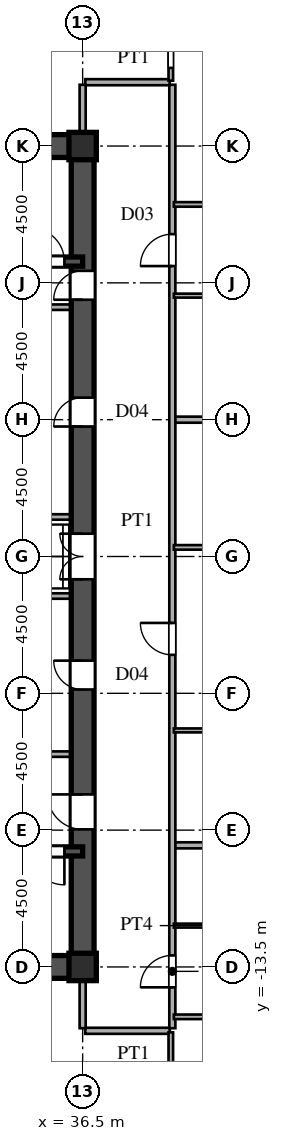
"""IFC4 building model, lengths in metres.
Left out: names, types, materials, properties, quantities, classifications, styles, units other than length and angle.
Written with IfcOpenShell. Run it as: python <this file> out.ifc"""

import sys

from ifc_helpers import new_model, si_unit, direction, frame, frame_2d, origin, origin_2d, place, context, subcontext, project, spatial, rectangle, i_section, extrude, source, transform, mapped, element, fill, save


model = new_model("IFC4")
c1 = context("Model", 3, precision=1e-05, world=origin(), true_north=direction((0.0, 1.0)))
c2 = subcontext(c1, "Body", "Model", "MODEL_VIEW")
j1 = project(units=[si_unit("LENGTHUNIT", "METRE"), si_unit("PLANEANGLEUNIT", "RADIAN")], contexts=[c1])
p1 = place(None, origin())
s1 = spatial("IfcSite", under=j1, at=p1, CompositionType="ELEMENT")
p2 = place(p1, origin())
s2 = spatial("IfcBuilding", under=s1, at=p2, CompositionType="ELEMENT")
p3 = place(p2, frame((0.0, 0.0, 18.9)))
s3 = spatial("IfcBuildingStorey", under=s2, at=p3, CompositionType="ELEMENT", Elevation=18.9)
m1 = source(origin(), c2, "Body", "SweptSolid", [
    extrude(i_section(OverallWidth=0.9, OverallDepth=0.9, WebThickness=0.036, FlangeThickness=0.055, at=origin_2d()), origin(), (0.0, 0.0, 1.0), 3.6),
])
for number, where, z_axis, x_axis in (
    (1, (36.5, -13.5, 0.0), (0.0, 0.0, 1.0), (1.0, 0.0, 0.0)),
    (2, (36.5, 13.5, 0.0), (0.0, 0.0, 1.0), (1.0, 0.0, 0.0)),
):
    element("IfcColumn", number, at=place(p3, frame(where, z_axis=z_axis, x_axis=x_axis)), inside=s3, PredefinedType="COLUMN", context=c2, shape_type="MappedRepresentation", body=[
        mapped(m1, transform((0.0, 0.0, 0.0), scale=1.0)),
    ])
for number, where, z_axis, x_axis in (
    (3, (27.5, -13.5, 0.0), (0.0, 0.0, 1.0), (1.0, 0.0, 0.0)),
    (4, (27.5, 13.5, 0.0), (0.0, 0.0, 1.0), (1.0, 0.0, 0.0)),
):
    element("IfcWall", number, at=place(p3, frame(where, z_axis=z_axis, x_axis=x_axis)), inside=s3, PredefinedType="SHEAR", context=c2, shape_type="SweptSolid", body=[
        extrude(rectangle(XDim=9.0, YDim=0.75, at=frame_2d((4.5, 0.0))), origin(), (0.0, 0.0, 1.0), 3.38),
    ])
p4 = place(p3, frame((36.5, -13.65, 0.0), z_axis=(0.0, 0.0, 1.0), x_axis=(0.0, 1.0, 0.0)))
e5 = element("IfcWall", 5, at=p4, inside=s3, PredefinedType="SHEAR", context=c2, shape_type="SweptSolid", body=[
    extrude(rectangle(XDim=7.15, YDim=0.75, at=frame_2d((3.575, 0.0))), origin(), (0.0, 0.0, 1.0), 3.38),
])
p5 = place(p4, frame((4.675, 0.0, 0.0)))
e6 = element("IfcOpeningElement", 6, at=p5, cuts=e5, PredefinedType="OPENING", context=c2, shape_type="SweptSolid", body=[
    extrude(rectangle(XDim=1.15, YDim=2.2, at=frame_2d((0.575, 1.1))), frame((0.0, 0.385, 0.0), z_axis=(0.0, -1.0, 0.0), x_axis=(1.0, 0.0, 0.0)), (0.0, 0.0, 1.0), 0.77),
])
p6 = place(p3, frame((36.5, -1.3, 0.0), z_axis=(0.0, 0.0, 1.0), x_axis=(0.0, 1.0, 0.0)))
e7 = element("IfcWall", 7, at=p6, inside=s3, PredefinedType="SHEAR", context=c2, shape_type="SweptSolid", body=[
    extrude(rectangle(XDim=2.6, YDim=0.75, at=frame_2d((1.3, 0.0))), origin(), (0.0, 0.0, 1.0), 3.38),
])
p7 = place(p6, frame((0.55, 0.0, 0.0)))
e8 = element("IfcOpeningElement", 8, at=p7, cuts=e7, PredefinedType="OPENING", context=c2, shape_type="SweptSolid", body=[
    extrude(rectangle(XDim=1.5, YDim=2.3, at=frame_2d((0.75, 1.15))), frame((0.0, 0.385, 0.0), z_axis=(0.0, -1.0, 0.0), x_axis=(1.0, 0.0, 0.0)), (0.0, 0.0, 1.0), 0.77),
])
p8 = place(p3, frame((36.5, 8.2, 0.0), z_axis=(0.0, 0.0, 1.0), x_axis=(0.0, 1.0, 0.0)))
e9 = element("IfcWall", 9, at=p8, inside=s3, PredefinedType="SHEAR", context=c2, shape_type="SweptSolid", body=[
    extrude(rectangle(XDim=5.45, YDim=0.75, at=frame_2d((2.725, 0.0))), origin(), (0.0, 0.0, 1.0), 3.38),
])
p9 = place(p8, frame((0.245, 0.0, 0.0)))
e10 = element("IfcOpeningElement", 10, at=p9, cuts=e9, PredefinedType="OPENING", context=c2, shape_type="SweptSolid", body=[
    extrude(rectangle(XDim=0.95, YDim=2.15, at=frame_2d((0.475, 1.075))), frame((0.0, 0.385, 0.0), z_axis=(0.0, -1.0, 0.0), x_axis=(1.0, 0.0, 0.0)), (0.0, 0.0, 1.0), 0.77),
])
p10 = place(p3, frame((36.5, -6.5, 0.0), z_axis=(0.0, 0.0, 1.0), x_axis=(0.0, 1.0, 0.0)))
e11 = element("IfcWall", 11, at=p10, inside=s3, PredefinedType="SHEAR", context=c2, shape_type="SweptSolid", body=[
    extrude(rectangle(XDim=5.2, YDim=0.75, at=frame_2d((2.6, 0.0))), origin(), (0.0, 0.0, 1.0), 3.38),
])
p11 = place(p10, frame((2.125, 0.0, 0.0)))
e12 = element("IfcOpeningElement", 12, at=p11, cuts=e11, PredefinedType="OPENING", context=c2, shape_type="SweptSolid", body=[
    extrude(rectangle(XDim=0.95, YDim=2.15, at=frame_2d((0.475, 1.075))), frame((0.0, 0.385, 0.0), z_axis=(0.0, -1.0, 0.0), x_axis=(1.0, 0.0, 0.0)), (0.0, 0.0, 1.0), 0.77),
])
p12 = place(p3, frame((36.5, 1.3, 0.0), z_axis=(0.0, 0.0, 1.0), x_axis=(0.0, 1.0, 0.0)))
e13 = element("IfcWall", 13, at=p12, inside=s3, PredefinedType="SHEAR", context=c2, shape_type="SweptSolid", body=[
    extrude(rectangle(XDim=6.9, YDim=0.75, at=frame_2d((3.45, 0.0))), origin(), (0.0, 0.0, 1.0), 3.38),
])
p13 = place(p12, frame((2.975, 0.0, 0.0)))
e14 = element("IfcOpeningElement", 14, at=p13, cuts=e13, PredefinedType="OPENING", context=c2, shape_type="SweptSolid", body=[
    extrude(rectangle(XDim=0.95, YDim=2.15, at=frame_2d((0.475, 1.075))), frame((0.0, 0.385, 0.0), z_axis=(0.0, -1.0, 0.0), x_axis=(1.0, 0.0, 0.0)), (0.0, 0.0, 1.0), 0.77),
])
p14 = place(p3, frame((27.5, -9.7, 0.0), z_axis=(0.0, 0.0, 1.0), x_axis=(1.0, 0.0, 0.0)))
e15 = element("IfcWall", 15, at=p14, inside=s3, PredefinedType="SHEAR", context=c2, shape_type="SweptSolid", body=[
    extrude(rectangle(XDim=9.0, YDim=0.3, at=frame_2d((4.5, 0.0))), origin(), (0.0, 0.0, 1.0), 3.38),
])
p15 = place(p14, frame((7.3, 0.0, 0.0)))
e16 = element("IfcOpeningElement", 16, at=p15, cuts=e15, PredefinedType="OPENING", context=c2, shape_type="SweptSolid", body=[
    extrude(rectangle(XDim=1.1, YDim=2.2, at=frame_2d((0.55, 1.1))), frame((0.0, 0.16, 0.0), z_axis=(0.0, -1.0, 0.0), x_axis=(1.0, 0.0, 0.0)), (0.0, 0.0, 1.0), 0.32),
])
p16 = place(p3, frame((27.5, 9.7, 0.0), z_axis=(0.0, 0.0, 1.0), x_axis=(1.0, 0.0, 0.0)))
e17 = element("IfcWall", 17, at=p16, inside=s3, PredefinedType="SHEAR", context=c2, shape_type="SweptSolid", body=[
    extrude(rectangle(XDim=9.0, YDim=0.3, at=frame_2d((4.5, 0.0))), origin(), (0.0, 0.0, 1.0), 3.38),
])
p17 = place(p16, frame((7.3, 0.0, 0.0)))
e18 = element("IfcOpeningElement", 18, at=p17, cuts=e17, PredefinedType="OPENING", context=c2, shape_type="SweptSolid", body=[
    extrude(rectangle(XDim=1.1, YDim=2.2, at=frame_2d((0.55, 1.1))), frame((0.0, 0.16, 0.0), z_axis=(0.0, -1.0, 0.0), x_axis=(1.0, 0.0, 0.0)), (0.0, 0.0, 1.0), 0.32),
])
for number, where, z_axis, x_axis in (
    (19, (30.45, -6.5, 0.0), (0.0, 0.0, 1.0), (1.0, 0.0, 0.0)),
    (20, (30.45, 8.2, 0.0), (0.0, 0.0, 1.0), (1.0, 0.0, 0.0)),
):
    element("IfcWall", number, at=place(p3, frame(where, z_axis=z_axis, x_axis=x_axis)), inside=s3, PredefinedType="PARTITIONING", context=c2, shape_type="SweptSolid", body=[
        extrude(rectangle(XDim=5.7, YDim=0.18, at=frame_2d((2.85, 0.0))), origin(), (0.0, 0.0, 1.0), 3.38),
    ])
for number, where, z_axis, x_axis in (
    (21, (33.2, -1.3, 0.0), (0.0, 0.0, 1.0), (1.0, 0.0, 0.0)),
    (22, (33.2, 1.3, 0.0), (0.0, 0.0, 1.0), (1.0, 0.0, 0.0)),
):
    element("IfcWall", number, at=place(p3, frame(where, z_axis=z_axis, x_axis=x_axis)), inside=s3, PredefinedType="PARTITIONING", context=c2, shape_type="SweptSolid", body=[
        extrude(rectangle(XDim=2.95, YDim=0.18, at=frame_2d((1.475, 0.0))), origin(), (0.0, 0.0, 1.0), 3.38),
    ])
p18 = place(p3, frame((36.585, -15.6, 0.0), z_axis=(0.0, 0.0, 1.0), x_axis=(1.0, 0.0, 0.0)))
e23 = element("IfcWall", 23, at=p18, inside=s3, PredefinedType="PARTITIONING", context=c2, shape_type="SweptSolid", body=[
    extrude(rectangle(XDim=2.78, YDim=0.2, at=frame_2d((1.39, 0.0))), origin(), (0.0, 0.0, 1.0), 3.38),
])
p19 = place(p3, frame((39.5, -15.14, 0.0), z_axis=(0.0, 0.0, 1.0), x_axis=(1.0, 0.0, 0.0)))
e24 = element("IfcWall", 24, at=p19, inside=s3, PredefinedType="PARTITIONING", context=c2, shape_type="SweptSolid", body=[
    extrude(rectangle(XDim=4.05, YDim=0.15, at=frame_2d((2.025, 0.0))), origin(), (0.0, 0.0, 1.0), 3.38),
])
p20 = place(p19, frame((1.55, 0.0, 0.0)))
e25 = element("IfcOpeningElement", 25, at=p20, cuts=e24, PredefinedType="OPENING", context=c2, shape_type="SweptSolid", body=[
    extrude(rectangle(XDim=0.95, YDim=2.15, at=frame_2d((0.475, 1.075))), frame((0.0, 0.085, 0.0), z_axis=(0.0, -1.0, 0.0), x_axis=(1.0, 0.0, 0.0)), (0.0, 0.0, 1.0), 0.17),
])
p21 = place(p3, frame((39.5, -12.14, 0.0), z_axis=(0.0, 0.0, 1.0), x_axis=(1.0, 0.0, 0.0)))
e26 = element("IfcWall", 26, at=p21, inside=s3, PredefinedType="PARTITIONING", context=c2, shape_type="SweptSolid", body=[
    extrude(rectangle(XDim=4.05, YDim=0.13, at=frame_2d((2.025, 0.0))), origin(), (0.0, 0.0, 1.0), 3.38),
])
p22 = place(p21, frame((1.585, 0.0, 0.0)))
e27 = element("IfcOpeningElement", 27, at=p22, cuts=e26, PredefinedType="OPENING", context=c2, shape_type="SweptSolid", body=[
    extrude(rectangle(XDim=0.88, YDim=2.1, at=frame_2d((0.44, 1.05))), frame((0.0, 0.075, 0.0), z_axis=(0.0, -1.0, 0.0), x_axis=(1.0, 0.0, 0.0)), (0.0, 0.0, 1.0), 0.15),
])
p23 = place(p3, frame((39.53, -9.5, 0.0), z_axis=(0.0, 0.0, 1.0), x_axis=(1.0, 0.0, 0.0)))
e28 = element("IfcWall", 28, at=p23, inside=s3, PredefinedType="PARTITIONING", context=c2, shape_type="SweptSolid", body=[
    extrude(rectangle(XDim=32.845, YDim=0.2, at=frame_2d((16.422, 0.0))), origin(), (0.0, 0.0, 1.0), 3.38),
])
p24 = place(p3, frame((39.5, -5.72, 0.0), z_axis=(0.0, 0.0, 1.0), x_axis=(1.0, 0.0, 0.0)))
e29 = element("IfcWall", 29, at=p24, inside=s3, PredefinedType="PARTITIONING", context=c2, shape_type="SweptSolid", body=[
    extrude(rectangle(XDim=4.05, YDim=0.13, at=frame_2d((2.025, 0.0))), origin(), (0.0, 0.0, 1.0), 3.38),
])
p25 = place(p24, frame((1.585, 0.0, 0.0)))
e30 = element("IfcOpeningElement", 30, at=p25, cuts=e29, PredefinedType="OPENING", context=c2, shape_type="SweptSolid", body=[
    extrude(rectangle(XDim=0.88, YDim=2.1, at=frame_2d((0.44, 1.05))), frame((0.0, 0.075, 0.0), z_axis=(0.0, -1.0, 0.0), x_axis=(1.0, 0.0, 0.0)), (0.0, 0.0, 1.0), 0.15),
])
p26 = place(p3, frame((39.5, 0.3, 0.0), z_axis=(0.0, 0.0, 1.0), x_axis=(1.0, 0.0, 0.0)))
e31 = element("IfcWall", 31, at=p26, inside=s3, PredefinedType="PARTITIONING", context=c2, shape_type="SweptSolid", body=[
    extrude(rectangle(XDim=4.05, YDim=0.15, at=frame_2d((2.025, 0.0))), origin(), (0.0, 0.0, 1.0), 3.38),
])
p27 = place(p26, frame((1.55, 0.0, 0.0)))
e32 = element("IfcOpeningElement", 32, at=p27, cuts=e31, PredefinedType="OPENING", context=c2, shape_type="SweptSolid", body=[
    extrude(rectangle(XDim=0.95, YDim=2.15, at=frame_2d((0.475, 1.075))), frame((0.0, 0.085, 0.0), z_axis=(0.0, -1.0, 0.0), x_axis=(1.0, 0.0, 0.0)), (0.0, 0.0, 1.0), 0.17),
])
p28 = place(p3, frame((39.53, 4.5, 0.0), z_axis=(0.0, 0.0, 1.0), x_axis=(1.0, 0.0, 0.0)))
e33 = element("IfcWall", 33, at=p28, inside=s3, PredefinedType="PARTITIONING", context=c2, shape_type="SweptSolid", body=[
    extrude(rectangle(XDim=14.99, YDim=0.2, at=frame_2d((7.495, 0.0))), origin(), (0.0, 0.0, 1.0), 2.68),
])
p29 = place(p3, frame((39.5, 8.58, 0.0), z_axis=(0.0, 0.0, 1.0), x_axis=(1.0, 0.0, 0.0)))
e34 = element("IfcWall", 34, at=p29, inside=s3, PredefinedType="PARTITIONING", context=c2, shape_type="SweptSolid", body=[
    extrude(rectangle(XDim=4.05, YDim=0.13, at=frame_2d((2.025, 0.0))), origin(), (0.0, 0.0, 1.0), 3.38),
])
p30 = place(p29, frame((1.585, 0.0, 0.0)))
e35 = element("IfcOpeningElement", 35, at=p30, cuts=e34, PredefinedType="OPENING", context=c2, shape_type="SweptSolid", body=[
    extrude(rectangle(XDim=0.88, YDim=2.1, at=frame_2d((0.44, 1.05))), frame((0.0, 0.075, 0.0), z_axis=(0.0, -1.0, 0.0), x_axis=(1.0, 0.0, 0.0)), (0.0, 0.0, 1.0), 0.15),
])
p31 = place(p3, frame((39.5, 11.58, 0.0), z_axis=(0.0, 0.0, 1.0), x_axis=(1.0, 0.0, 0.0)))
e36 = element("IfcWall", 36, at=p31, inside=s3, PredefinedType="PARTITIONING", context=c2, shape_type="SweptSolid", body=[
    extrude(rectangle(XDim=4.05, YDim=0.15, at=frame_2d((2.025, 0.0))), origin(), (0.0, 0.0, 1.0), 3.38),
])
p32 = place(p31, frame((1.55, 0.0, 0.0)))
e37 = element("IfcOpeningElement", 37, at=p32, cuts=e36, PredefinedType="OPENING", context=c2, shape_type="SweptSolid", body=[
    extrude(rectangle(XDim=0.95, YDim=2.15, at=frame_2d((0.475, 1.075))), frame((0.0, 0.085, 0.0), z_axis=(0.0, -1.0, 0.0), x_axis=(1.0, 0.0, 0.0)), (0.0, 0.0, 1.0), 0.17),
])
p33 = place(p3, frame((36.585, 15.6, 0.0), z_axis=(0.0, 0.0, 1.0), x_axis=(1.0, 0.0, 0.0)))
e38 = element("IfcWall", 38, at=p33, inside=s3, PredefinedType="PARTITIONING", context=c2, shape_type="SweptSolid", body=[
    extrude(rectangle(XDim=2.78, YDim=0.2, at=frame_2d((1.39, 0.0))), origin(), (0.0, 0.0, 1.0), 3.38),
])
for number, where, z_axis, x_axis in (
    (39, (36.5, -15.515, 0.0), (0.0, 0.0, 1.0), (0.0, 1.0, 0.0)),
    (40, (36.5, 13.88, 0.0), (0.0, 0.0, 1.0), (0.0, 1.0, 0.0)),
):
    element("IfcWall", number, at=place(p3, frame(where, z_axis=z_axis, x_axis=x_axis)), inside=s3, PredefinedType="PARTITIONING", context=c2, shape_type="SweptSolid", body=[
        extrude(rectangle(XDim=1.635, YDim=0.2, at=frame_2d((0.817, 0.0))), origin(), (0.0, 0.0, 1.0), 2.68),
    ])
p34 = place(p3, frame((39.4, -23.433, 0.0), z_axis=(0.0, 0.0, 1.0), x_axis=(0.0, 1.0, 0.0)))
e41 = element("IfcWall", 41, at=p34, inside=s3, PredefinedType="PARTITIONING", context=c2, shape_type="SweptSolid", body=[
    extrude(rectangle(XDim=7.783, YDim=0.15, at=frame_2d((3.892, 0.0))), origin(), (0.0, 0.0, 1.0), 3.38),
])
p35 = place(p34, frame((1.134, 0.0, 0.0)))
e42 = element("IfcOpeningElement", 42, at=p35, cuts=e41, PredefinedType="OPENING", context=c2, shape_type="SweptSolid", body=[
    extrude(rectangle(XDim=0.95, YDim=2.15, at=frame_2d((0.475, 1.075))), frame((0.0, 0.085, 0.0), z_axis=(0.0, -1.0, 0.0), x_axis=(1.0, 0.0, 0.0)), (0.0, 0.0, 1.0), 0.17),
])
p36 = place(p3, frame((39.4, 15.65, 0.0), z_axis=(0.0, 0.0, 1.0), x_axis=(0.0, 1.0, 0.0)))
e43 = element("IfcWall", 43, at=p36, inside=s3, PredefinedType="PARTITIONING", context=c2, shape_type="SweptSolid", body=[
    extrude(rectangle(XDim=7.783, YDim=0.15, at=frame_2d((3.892, 0.0))), origin(), (0.0, 0.0, 1.0), 3.38),
])
p37 = place(p36, frame((0.419, 0.0, 0.0)))
e44 = element("IfcOpeningElement", 44, at=p37, cuts=e43, PredefinedType="OPENING", context=c2, shape_type="SweptSolid", body=[
    extrude(rectangle(XDim=0.95, YDim=2.15, at=frame_2d((0.475, 1.075))), frame((0.0, 0.085, 0.0), z_axis=(0.0, -1.0, 0.0), x_axis=(1.0, 0.0, 0.0)), (0.0, 0.0, 1.0), 0.17),
])
p38 = place(p36, frame((2.744, 0.0, 0.0)))
e45 = element("IfcOpeningElement", 45, at=p38, cuts=e43, PredefinedType="OPENING", context=c2, shape_type="SweptSolid", body=[
    extrude(rectangle(XDim=0.95, YDim=2.15, at=frame_2d((0.475, 1.075))), frame((0.0, 0.085, 0.0), z_axis=(0.0, -1.0, 0.0), x_axis=(1.0, 0.0, 0.0)), (0.0, 0.0, 1.0), 0.17),
])
p39 = place(p3, frame((39.45, -15.515, 0.0), z_axis=(0.0, 0.0, 1.0), x_axis=(0.0, 1.0, 0.0)))
e46 = element("IfcWall", 46, at=p39, inside=s3, PredefinedType="PARTITIONING", context=c2, shape_type="SweptSolid", body=[
    extrude(rectangle(XDim=31.03, YDim=0.2, at=frame_2d((15.515, 0.0))), origin(), (0.0, 0.0, 1.0), 3.38),
])
p40 = place(p39, frame((1.345, 0.0, 0.0)))
e47 = element("IfcOpeningElement", 47, at=p40, cuts=e46, PredefinedType="OPENING", context=c2, shape_type="SweptSolid", body=[
    extrude(rectangle(XDim=1.05, YDim=2.25, at=frame_2d((0.525, 1.125))), frame((0.0, 0.11, 0.0), z_axis=(0.0, -1.0, 0.0), x_axis=(1.0, 0.0, 0.0)), (0.0, 0.0, 1.0), 0.22),
])
p41 = place(p39, frame((12.28, 0.0, 0.0)))
e48 = element("IfcOpeningElement", 48, at=p41, cuts=e46, PredefinedType="OPENING", context=c2, shape_type="SweptSolid", body=[
    extrude(rectangle(XDim=1.05, YDim=2.25, at=frame_2d((0.525, 1.125))), frame((0.0, 0.11, 0.0), z_axis=(0.0, -1.0, 0.0), x_axis=(1.0, 0.0, 0.0)), (0.0, 0.0, 1.0), 0.22),
])
p42 = place(p39, frame((25.067, 0.0, 0.0)))
e49 = element("IfcOpeningElement", 49, at=p42, cuts=e46, PredefinedType="OPENING", context=c2, shape_type="SweptSolid", body=[
    extrude(rectangle(XDim=1.05, YDim=2.25, at=frame_2d((0.525, 1.125))), frame((0.0, 0.11, 0.0), z_axis=(0.0, -1.0, 0.0), x_axis=(1.0, 0.0, 0.0)), (0.0, 0.0, 1.0), 0.22),
])
m2 = source(origin(), c2, "Body", "SweptSolid", [
    extrude(rectangle(XDim=1.15, YDim=2.2, at=frame_2d((0.575, 1.1))), frame((0.0, 0.025, 0.0), z_axis=(0.0, -1.0, 0.0), x_axis=(1.0, 0.0, 0.0)), (0.0, 0.0, 1.0), 0.05),
])
p43 = place(p5, origin())
e50 = element("IfcDoor", 50, at=p43, inside=s3, OperationType="SINGLE_SWING_RIGHT", PredefinedType="DOOR", context=c2, shape_type="MappedRepresentation", body=[
    mapped(m2, transform((0.0, 0.0, 0.0), scale=1.0)),
])
fill(e6, e50)
m3 = source(origin(), c2, "Body", "SweptSolid", [
    extrude(rectangle(XDim=1.5, YDim=2.3, at=frame_2d((0.75, 1.15))), frame((0.0, 0.025, 0.0), z_axis=(0.0, -1.0, 0.0), x_axis=(1.0, 0.0, 0.0)), (0.0, 0.0, 1.0), 0.05),
])
p44 = place(p7, origin())
e51 = element("IfcDoor", 51, at=p44, inside=s3, OperationType="DOUBLE_SWING_LEFT", PredefinedType="DOOR", context=c2, shape_type="MappedRepresentation", body=[
    mapped(m3, transform((0.0, 0.0, 0.0), scale=1.0)),
])
fill(e8, e51)
m4 = source(origin(), c2, "Body", "SweptSolid", [
    extrude(rectangle(XDim=0.95, YDim=2.15, at=frame_2d((0.475, 1.075))), frame((0.0, 0.025, 0.0), z_axis=(0.0, -1.0, 0.0), x_axis=(1.0, 0.0, 0.0)), (0.0, 0.0, 1.0), 0.05),
])
p45 = place(p9, origin())
e52 = element("IfcDoor", 52, at=p45, inside=s3, OperationType="SINGLE_SWING_LEFT", PredefinedType="DOOR", context=c2, shape_type="MappedRepresentation", body=[
    mapped(m4, transform((0.0, 0.0, 0.0), scale=1.0)),
])
fill(e10, e52)
p46 = place(p11, origin())
e53 = element("IfcDoor", 53, at=p46, inside=s3, OperationType="SINGLE_SWING_RIGHT", PredefinedType="DOOR", context=c2, shape_type="MappedRepresentation", body=[
    mapped(m4, transform((0.0, 0.0, 0.0), scale=1.0)),
])
fill(e12, e53)
p47 = place(p13, origin())
e54 = element("IfcDoor", 54, at=p47, inside=s3, OperationType="SINGLE_SWING_LEFT", PredefinedType="DOOR", context=c2, shape_type="MappedRepresentation", body=[
    mapped(m4, transform((0.0, 0.0, 0.0), scale=1.0)),
])
fill(e14, e54)
m5 = source(origin(), c2, "Body", "SweptSolid", [
    extrude(rectangle(XDim=1.1, YDim=2.2, at=frame_2d((0.55, 1.1))), frame((0.0, 0.025, 0.0), z_axis=(0.0, -1.0, 0.0), x_axis=(1.0, 0.0, 0.0)), (0.0, 0.0, 1.0), 0.05),
])
p48 = place(p15, frame((1.1, 0.0, 0.0), z_axis=(0.0, 0.0, 1.0), x_axis=(-1.0, 0.0, 0.0)))
e55 = element("IfcDoor", 55, at=p48, inside=s3, OperationType="SINGLE_SWING_RIGHT", PredefinedType="DOOR", context=c2, shape_type="MappedRepresentation", body=[
    mapped(m5, transform((0.0, 0.0, 0.0), scale=1.0)),
])
fill(e16, e55)
p49 = place(p17, origin())
e56 = element("IfcDoor", 56, at=p49, inside=s3, OperationType="SINGLE_SWING_LEFT", PredefinedType="DOOR", context=c2, shape_type="MappedRepresentation", body=[
    mapped(m5, transform((0.0, 0.0, 0.0), scale=1.0)),
])
fill(e18, e56)
m6 = source(origin(), c2, "Body", "SweptSolid", [
    extrude(rectangle(XDim=1.05, YDim=2.25, at=frame_2d((0.525, 1.125))), frame((0.0, 0.025, 0.0), z_axis=(0.0, -1.0, 0.0), x_axis=(1.0, 0.0, 0.0)), (0.0, 0.0, 1.0), 0.05),
])
p50 = place(p40, origin())
e57 = element("IfcDoor", 57, at=p50, inside=s3, OperationType="SINGLE_SWING_LEFT", PredefinedType="DOOR", context=c2, shape_type="MappedRepresentation", body=[
    mapped(m6, transform((0.0, 0.0, 0.0), scale=1.0)),
])
fill(e47, e57)
p51 = place(p41, origin())
e58 = element("IfcDoor", 58, at=p51, inside=s3, OperationType="SINGLE_SWING_RIGHT", PredefinedType="DOOR", context=c2, shape_type="MappedRepresentation", body=[
    mapped(m6, transform((0.0, 0.0, 0.0), scale=1.0)),
])
fill(e48, e58)
p52 = place(p42, origin())
e59 = element("IfcDoor", 59, at=p52, inside=s3, OperationType="SINGLE_SWING_LEFT", PredefinedType="DOOR", context=c2, shape_type="MappedRepresentation", body=[
    mapped(m6, transform((0.0, 0.0, 0.0), scale=1.0)),
])
fill(e49, e59)
save(model, sys.argv[1])
